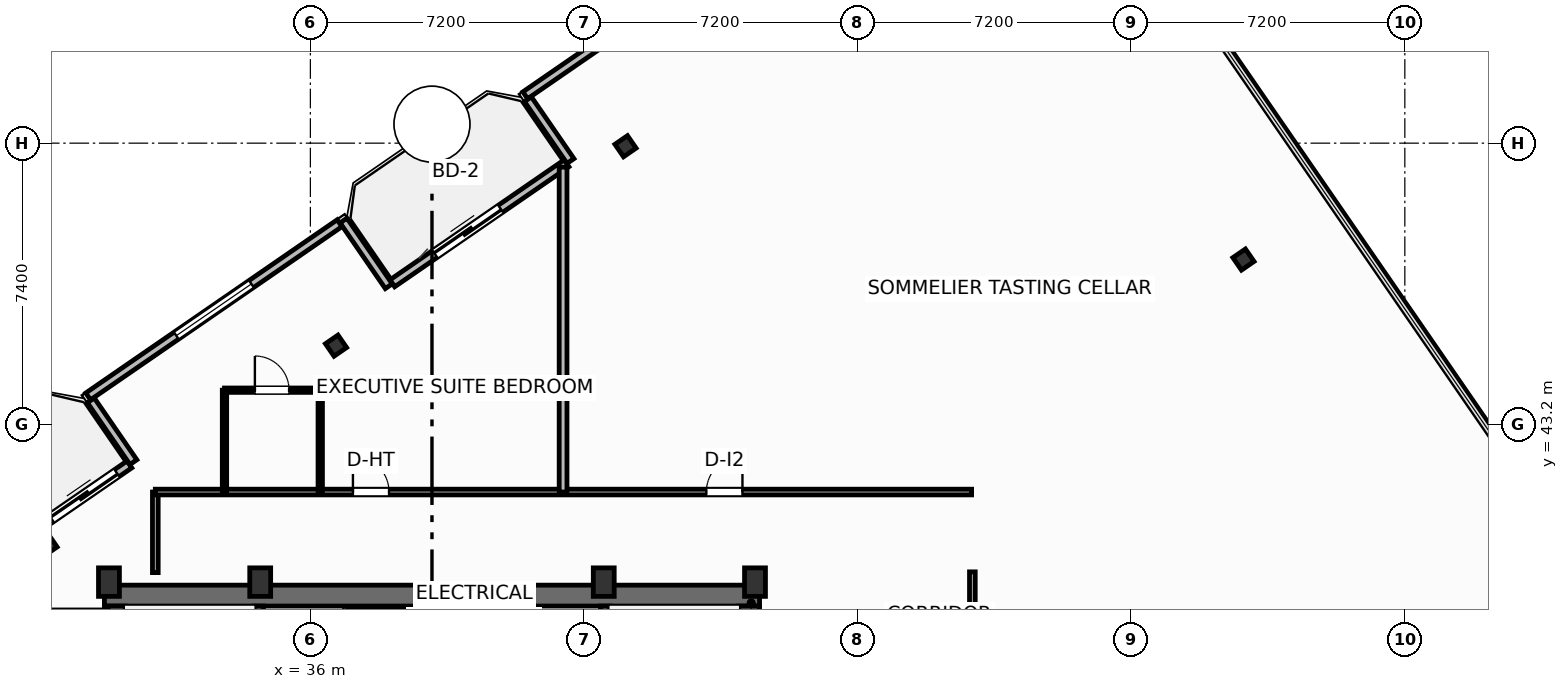
"""IFC4 building model, lengths in metres.
Left out: names, types, materials, properties, quantities, classifications, styles, units other than length and angle.
Written with IfcOpenShell. Run it as: python <this file> out.ifc"""

import sys

from ifc_helpers import new_model, si_unit, direction, frame, frame_2d, origin, origin_2d, place, context, subcontext, project, spatial, rectangle, i_section, extrude, element, fill, save


model = new_model("IFC4")
c1 = context("Model", 3, precision=1e-05, world=origin(), true_north=direction((0.0, 1.0)))
c2 = subcontext(c1, "Body", "Model", "MODEL_VIEW")
j1 = project(units=[si_unit("LENGTHUNIT", "METRE"), si_unit("PLANEANGLEUNIT", "RADIAN")], contexts=[c1])
p1 = place(None, origin())
s1 = spatial("IfcSite", under=j1, at=p1, CompositionType="ELEMENT")
p2 = place(p1, origin())
s2 = spatial("IfcBuilding", under=s1, at=p2, CompositionType="ELEMENT")
p3 = place(p2, frame((0.0, 0.0, 284.1)))
s3 = spatial("IfcBuildingStorey", under=s2, at=p3, CompositionType="ELEMENT", Elevation=284.1)
for number, where, z_axis, x_axis in (
    (1, (30.7, 39.05, 0.0), (0.0, 0.0, 1.0), (1.0, 0.0, 0.0)),
    (2, (34.68, 39.05, 0.0), (0.0, 0.0, 1.0), (1.0, 0.0, 0.0)),
    (3, (43.72, 39.05, 0.0), (0.0, 0.0, 1.0), (1.0, 0.0, 0.0)),
    (4, (47.7, 39.05, 0.0), (0.0, 0.0, 1.0), (1.0, 0.0, 0.0)),
):
    element("IfcColumn", number, at=place(p3, frame(where, z_axis=z_axis, x_axis=x_axis)), inside=s3, PredefinedType="COLUMN", context=c2, shape_type="SweptSolid", body=[
        extrude(rectangle(XDim=0.55, YDim=0.75, at=origin_2d()), origin(), (0.0, 0.0, 1.0), 3.7),
    ])
p4 = place(p3, frame((30.58, 38.695, 0.0), z_axis=(0.0, 0.0, 1.0), x_axis=(1.0, 0.0, 0.0)))
e5 = element("IfcWall", 5, at=p4, inside=s3, PredefinedType="SHEAR", context=c2, shape_type="SweptSolid", body=[
    extrude(rectangle(XDim=17.24, YDim=0.55, at=frame_2d((8.62, 0.0))), origin(), (0.0, 0.0, 1.0), 3.45),
])
for number, where, z_axis, x_axis in (
    (6, (30.855, 29.2, 0.0), (0.0, 0.0, 1.0), (0.0, 1.0, 0.0)),
    (7, (47.545, 29.2, 0.0), (0.0, 0.0, 1.0), (0.0, 1.0, 0.0)),
):
    element("IfcWall", number, at=place(p3, frame(where, z_axis=z_axis, x_axis=x_axis)), inside=s3, PredefinedType="SHEAR", context=c2, shape_type="SweptSolid", body=[
        extrude(rectangle(XDim=9.22, YDim=0.55, at=frame_2d((4.61, 0.0))), origin(), (0.0, 0.0, 1.0), 3.45),
    ])
p5 = place(p3, frame((34.64, 29.2, 0.0), z_axis=(0.0, 0.0, 1.0), x_axis=(0.0, 1.0, 0.0)))
e8 = element("IfcWall", 8, at=p5, inside=s3, PredefinedType="SHEAR", context=c2, shape_type="SweptSolid", body=[
    extrude(rectangle(XDim=9.22, YDim=0.25, at=frame_2d((4.61, 0.0))), origin(), (0.0, 0.0, 1.0), 3.45),
])
p6 = place(p5, frame((0.65, 0.0, 0.0)))
e9 = element("IfcOpeningElement", 9, at=p6, cuts=e8, PredefinedType="OPENING", context=c2, shape_type="SweptSolid", body=[
    extrude(rectangle(XDim=1.05, YDim=2.15, at=frame_2d((0.525, 1.075))), frame((0.0, 0.135, 0.0), z_axis=(0.0, -1.0, 0.0), x_axis=(1.0, 0.0, 0.0)), (0.0, 0.0, 1.0), 0.27),
])
p7 = place(p3, frame((43.76, 29.2, 0.0), z_axis=(0.0, 0.0, 1.0), x_axis=(0.0, 1.0, 0.0)))
e10 = element("IfcWall", 10, at=p7, inside=s3, PredefinedType="SHEAR", context=c2, shape_type="SweptSolid", body=[
    extrude(rectangle(XDim=9.22, YDim=0.25, at=frame_2d((4.61, 0.0))), origin(), (0.0, 0.0, 1.0), 3.45),
])
p8 = place(p7, frame((0.65, 0.0, 0.0)))
e11 = element("IfcOpeningElement", 11, at=p8, cuts=e10, PredefinedType="OPENING", context=c2, shape_type="SweptSolid", body=[
    extrude(rectangle(XDim=1.05, YDim=2.15, at=frame_2d((0.525, 1.075))), frame((0.0, 0.135, 0.0), z_axis=(0.0, -1.0, 0.0), x_axis=(1.0, 0.0, 0.0)), (0.0, 0.0, 1.0), 0.27),
])
for number, where, z_axis, x_axis in (
    (12, (60.554, 47.537, 0.0), (0.0, 0.0, 1.0), (0.824, 0.567, 0.0)),
    (13, (44.292, 50.519, 0.0), (0.0, 0.0, 1.0), (0.824, 0.567, 0.0)),
    (14, (36.675, 45.272, 0.0), (0.0, 0.0, 1.0), (0.824, 0.567, 0.0)),
    (15, (29.057, 40.025, 0.0), (0.0, 0.0, 1.0), (0.824, 0.567, 0.0)),
):
    element("IfcColumn", number, at=place(p3, frame(where, z_axis=z_axis, x_axis=x_axis)), inside=s3, PredefinedType="COLUMN", context=c2, shape_type="SweptSolid", body=[
        extrude(i_section(OverallWidth=0.401, OverallDepth=0.399, WebThickness=0.025, FlangeThickness=0.04, FilletRadius=0.022, at=origin_2d()), origin(), (0.0, 0.0, 1.0), 3.7),
    ])
p9 = place(p3, frame((26.297, 38.743, 0.0), z_axis=(0.0, 0.0, 1.0), x_axis=(0.823534636215, 0.567265989598, 0.0)))
e16 = element("IfcWall", 16, at=p9, inside=s3, PredefinedType="SOLIDWALL", context=c2, shape_type="SweptSolid", body=[
    extrude(rectangle(XDim=6.0, YDim=0.22, at=frame_2d((3.0, 0.0))), origin(), (0.0, 0.0, 1.0), 2.73),
])
p10 = place(p9, frame((3.5, 0.0, 0.0)))
e17 = element("IfcOpeningElement", 17, at=p10, cuts=e16, PredefinedType="OPENING", context=c2, shape_type="SweptSolid", body=[
    extrude(rectangle(XDim=2.1, YDim=2.3, at=frame_2d((1.05, 1.15))), frame((0.0, 0.12, 0.0), z_axis=(0.0, -1.0, 0.0), x_axis=(1.0, 0.0, 0.0)), (0.0, 0.0, 1.0), 0.24),
])
p11 = place(p9, frame((0.55, 0.0, 0.75)))
e18 = element("IfcOpeningElement", 18, at=p11, cuts=e16, PredefinedType="OPENING", context=c2, shape_type="SweptSolid", body=[
    extrude(rectangle(XDim=2.4, YDim=1.85, at=frame_2d((1.2, 0.925))), frame((0.0, 0.12, 0.0), z_axis=(0.0, -1.0, 0.0), x_axis=(1.0, 0.0, 0.0)), (0.0, 0.0, 1.0), 0.24),
])
p12 = place(p3, frame((38.156, 46.912, 0.0), z_axis=(0.0, 0.0, 1.0), x_axis=(0.823527178548, 0.567276816195, 0.0)))
e19 = element("IfcWall", 19, at=p12, inside=s3, PredefinedType="SOLIDWALL", context=c2, shape_type="SweptSolid", body=[
    extrude(rectangle(XDim=5.567, YDim=0.22, at=frame_2d((2.783, 0.0))), origin(), (0.0, 0.0, 1.0), 2.73),
])
p13 = place(p12, frame((1.36, 0.0, 0.0)))
e20 = element("IfcOpeningElement", 20, at=p13, cuts=e19, PredefinedType="OPENING", context=c2, shape_type="SweptSolid", body=[
    extrude(rectangle(XDim=2.1, YDim=2.3, at=frame_2d((1.05, 1.15))), frame((0.0, 0.12, 0.0), z_axis=(0.0, -1.0, 0.0), x_axis=(1.0, 0.0, 0.0)), (0.0, 0.0, 1.0), 0.24),
])
p14 = place(p3, frame((50.697, 58.087, 0.0), z_axis=(0.0, 0.0, 1.0), x_axis=(-0.823539455464, -0.567258993137, 0.0)))
e21 = element("IfcWall", 21, at=p14, inside=s3, PredefinedType="SOLIDWALL", context=c2, shape_type="SweptSolid", body=[
    extrude(rectangle(XDim=10.98, YDim=0.22, at=frame_2d((5.49, 0.0))), origin(), (0.0, 0.0, 1.0), 2.73),
])
p15 = place(p14, frame((4.29, 0.0, 0.8)))
e22 = element("IfcOpeningElement", 22, at=p15, cuts=e21, PredefinedType="OPENING", context=c2, shape_type="SweptSolid", body=[
    extrude(rectangle(XDim=2.4, YDim=1.85, at=frame_2d((1.2, 0.925))), frame((0.0, 0.12, 0.0), z_axis=(0.0, -1.0, 0.0), x_axis=(1.0, 0.0, 0.0)), (0.0, 0.0, 1.0), 0.24),
])
p16 = place(p3, frame((41.725, 51.756, 0.0), z_axis=(0.0, 0.0, 1.0), x_axis=(0.567273565974, -0.823529417415, 0.0)))
e23 = element("IfcWall", 23, at=p16, inside=s3, PredefinedType="SOLIDWALL", context=c2, shape_type="SweptSolid", body=[
    extrude(rectangle(XDim=1.975, YDim=0.22, at=frame_2d((0.988, 0.0))), origin(), (0.0, 0.0, 1.0), 2.73),
])
p17 = place(p3, frame((38.063, 46.835, 0.0), z_axis=(0.0, 0.0, 1.0), x_axis=(-0.567219383419, 0.823566737474, 0.0)))
e24 = element("IfcWall", 24, at=p17, inside=s3, PredefinedType="SOLIDWALL", context=c2, shape_type="SweptSolid", body=[
    extrude(rectangle(XDim=2.1, YDim=0.22, at=frame_2d((1.05, 0.0))), origin(), (0.0, 0.0, 1.0), 2.73),
])
p18 = place(p3, frame((36.769, 48.494, 0.0), z_axis=(0.0, 0.0, 1.0), x_axis=(-0.823521165086, -0.56728554596, 0.0)))
e25 = element("IfcWall", 25, at=p18, inside=s3, PredefinedType="SOLIDWALL", context=c2, shape_type="SweptSolid", body=[
    extrude(rectangle(XDim=8.035, YDim=0.22, at=frame_2d((4.018, 0.0))), origin(), (0.0, 0.0, 1.0), 2.73),
])
p19 = place(p18, frame((2.817, 0.0, 0.8)))
e26 = element("IfcOpeningElement", 26, at=p19, cuts=e25, PredefinedType="OPENING", context=c2, shape_type="SweptSolid", body=[
    extrude(rectangle(XDim=2.4, YDim=1.85, at=frame_2d((1.2, 0.925))), frame((0.0, 0.12, 0.0), z_axis=(0.0, -1.0, 0.0), x_axis=(1.0, 0.0, 0.0)), (0.0, 0.0, 1.0), 0.24),
])
p20 = place(p3, frame((30.223, 43.833, 0.0), z_axis=(0.0, 0.0, 1.0), x_axis=(0.567215821234, -0.823569190865, 0.0)))
e27 = element("IfcWall", 27, at=p20, inside=s3, PredefinedType="SOLIDWALL", context=c2, shape_type="SweptSolid", body=[
    extrude(rectangle(XDim=1.975, YDim=0.22, at=frame_2d((0.988, 0.0))), origin(), (0.0, 0.0, 1.0), 2.73),
])
p21 = place(p3, frame((53.42, 19.3, 0.0), z_axis=(0.0, 0.0, 1.0), x_axis=(0.0, 1.0, 0.0)))
e28 = element("IfcWall", 28, at=p21, inside=s3, PredefinedType="PARTITIONING", context=c2, shape_type="SweptSolid", body=[
    extrude(rectangle(XDim=20.02, YDim=0.15, at=frame_2d((10.01, 0.0))), origin(), (0.0, 0.0, 1.0), 3.45),
])
p22 = place(p21, frame((7.4, 0.0, 0.0)))
e29 = element("IfcOpeningElement", 29, at=p22, cuts=e28, PredefinedType="OPENING", context=c2, shape_type="SweptSolid", body=[
    extrude(rectangle(XDim=1.0, YDim=2.05, at=frame_2d((0.5, 1.025))), frame((0.0, 0.085, 0.0), z_axis=(0.0, -1.0, 0.0), x_axis=(1.0, 0.0, 0.0)), (0.0, 0.0, 1.0), 0.17),
])
p23 = place(p21, frame((12.5, 0.0, 0.0)))
e30 = element("IfcOpeningElement", 30, at=p23, cuts=e28, PredefinedType="OPENING", context=c2, shape_type="SweptSolid", body=[
    extrude(rectangle(XDim=1.0, YDim=2.05, at=frame_2d((0.5, 1.025))), frame((0.0, 0.085, 0.0), z_axis=(0.0, -1.0, 0.0), x_axis=(1.0, 0.0, 0.0)), (0.0, 0.0, 1.0), 0.17),
])
p24 = place(p3, frame((31.92, 39.3, 0.0), z_axis=(0.0, 0.0, 1.0), x_axis=(0.0, 1.0, 0.0)))
e31 = element("IfcWall", 31, at=p24, inside=s3, PredefinedType="PARTITIONING", context=c2, shape_type="SweptSolid", body=[
    extrude(rectangle(XDim=2.12, YDim=0.15, at=frame_2d((1.06, 0.0))), origin(), (0.0, 0.0, 1.0), 3.45),
])
p25 = place(p3, frame((31.92, 41.42, 0.0), z_axis=(0.0, 0.0, 1.0), x_axis=(1.0, 0.0, 0.0)))
e32 = element("IfcWall", 32, at=p25, inside=s3, PredefinedType="PARTITIONING", context=c2, shape_type="SweptSolid", body=[
    extrude(rectangle(XDim=21.48, YDim=0.15, at=frame_2d((10.74, 0.0))), origin(), (0.0, 0.0, 1.0), 3.45),
])
p26 = place(p25, frame((5.2, 0.0, 0.0)))
e33 = element("IfcOpeningElement", 33, at=p26, cuts=e32, PredefinedType="OPENING", context=c2, shape_type="SweptSolid", body=[
    extrude(rectangle(XDim=0.95, YDim=2.15, at=frame_2d((0.475, 1.075))), frame((0.0, 0.085, 0.0), z_axis=(0.0, -1.0, 0.0), x_axis=(1.0, 0.0, 0.0)), (0.0, 0.0, 1.0), 0.17),
])
p27 = place(p25, frame((14.5, 0.0, 0.0)))
e34 = element("IfcOpeningElement", 34, at=p27, cuts=e32, PredefinedType="OPENING", context=c2, shape_type="SweptSolid", body=[
    extrude(rectangle(XDim=0.95, YDim=2.05, at=frame_2d((0.475, 1.025))), frame((0.0, 0.085, 0.0), z_axis=(0.0, -1.0, 0.0), x_axis=(1.0, 0.0, 0.0)), (0.0, 0.0, 1.0), 0.17),
])
p28 = place(p3, frame((33.74, 41.42, 0.0), z_axis=(0.0, 0.0, 1.0), x_axis=(0.0, 1.0, 0.0)))
e35 = element("IfcWall", 35, at=p28, inside=s3, PredefinedType="PARTITIONING", context=c2, shape_type="SweptSolid", body=[
    extrude(rectangle(XDim=2.68, YDim=0.115, at=frame_2d((1.34, 0.0))), origin(), (0.0, 0.0, 1.0), 3.45),
])
p29 = place(p3, frame((36.26, 41.42, 0.0), z_axis=(0.0, 0.0, 1.0), x_axis=(0.0, 1.0, 0.0)))
e36 = element("IfcWall", 36, at=p29, inside=s3, PredefinedType="PARTITIONING", context=c2, shape_type="SweptSolid", body=[
    extrude(rectangle(XDim=2.68, YDim=0.115, at=frame_2d((1.34, 0.0))), origin(), (0.0, 0.0, 1.0), 2.739),
])
p30 = place(p3, frame((33.74, 44.1, 0.0), z_axis=(0.0, 0.0, 1.0), x_axis=(1.0, 0.0, 0.0)))
e37 = element("IfcWall", 37, at=p30, inside=s3, PredefinedType="PARTITIONING", context=c2, shape_type="SweptSolid", body=[
    extrude(rectangle(XDim=2.52, YDim=0.115, at=frame_2d((1.26, 0.0))), origin(), (0.0, 0.0, 1.0), 3.45),
])
p31 = place(p30, frame((0.8, 0.0, 0.0)))
e38 = element("IfcOpeningElement", 38, at=p31, cuts=e37, PredefinedType="OPENING", context=c2, shape_type="SweptSolid", body=[
    extrude(rectangle(XDim=0.9, YDim=2.05, at=frame_2d((0.45, 1.025))), frame((0.0, 0.067, 0.0), z_axis=(0.0, -1.0, 0.0), x_axis=(1.0, 0.0, 0.0)), (0.0, 0.0, 1.0), 0.135),
])
p32 = place(p3, frame((42.65, 41.42, 0.0), z_axis=(0.0, 0.0, 1.0), x_axis=(0.0, 1.0, 0.0)))
e39 = element("IfcWall", 39, at=p32, inside=s3, PredefinedType="PARTITIONING", context=c2, shape_type="SweptSolid", body=[
    extrude(rectangle(XDim=8.551, YDim=0.205, at=frame_2d((4.275, 0.0))), origin(), (0.0, 0.0, 1.0), 3.45),
])
p33 = place(p10, origin())
e40 = element("IfcDoor", 40, at=p33, inside=s3, OperationType="SLIDING_TO_LEFT", PredefinedType="DOOR", context=c2, shape_type="SweptSolid", body=[
    extrude(rectangle(XDim=2.1, YDim=2.3, at=frame_2d((1.05, 1.15))), frame((0.0, 0.025, 0.0), z_axis=(0.0, -1.0, 0.0), x_axis=(1.0, 0.0, 0.0)), (0.0, 0.0, 1.0), 0.05),
])
fill(e17, e40)
p34 = place(p13, origin())
e41 = element("IfcDoor", 41, at=p34, inside=s3, OperationType="SLIDING_TO_LEFT", PredefinedType="DOOR", context=c2, shape_type="SweptSolid", body=[
    extrude(rectangle(XDim=2.1, YDim=2.3, at=frame_2d((1.05, 1.15))), frame((0.0, 0.025, 0.0), z_axis=(0.0, -1.0, 0.0), x_axis=(1.0, 0.0, 0.0)), (0.0, 0.0, 1.0), 0.05),
])
fill(e20, e41)
p35 = place(p19, origin())
e42 = element("IfcWindow", 42, at=p35, inside=s3, PartitioningType="SINGLE_PANEL", PredefinedType="WINDOW", context=c2, shape_type="SweptSolid", body=[
    extrude(rectangle(XDim=2.4, YDim=1.85, at=frame_2d((1.2, 0.925))), frame((0.0, 0.03, 0.0), z_axis=(0.0, -1.0, 0.0), x_axis=(1.0, 0.0, 0.0)), (0.0, 0.0, 1.0), 0.06),
])
fill(e26, e42)
p36 = place(p26, origin())
e43 = element("IfcDoor", 43, at=p36, inside=s3, OperationType="SINGLE_SWING_LEFT", PredefinedType="DOOR", context=c2, shape_type="SweptSolid", body=[
    extrude(rectangle(XDim=0.95, YDim=2.15, at=frame_2d((0.475, 1.075))), frame((0.0, 0.025, 0.0), z_axis=(0.0, -1.0, 0.0), x_axis=(1.0, 0.0, 0.0)), (0.0, 0.0, 1.0), 0.05),
])
fill(e33, e43)
p37 = place(p27, origin())
e44 = element("IfcDoor", 44, at=p37, inside=s3, OperationType="SINGLE_SWING_RIGHT", PredefinedType="DOOR", context=c2, shape_type="SweptSolid", body=[
    extrude(rectangle(XDim=0.95, YDim=2.05, at=frame_2d((0.475, 1.025))), frame((0.0, 0.025, 0.0), z_axis=(0.0, -1.0, 0.0), x_axis=(1.0, 0.0, 0.0)), (0.0, 0.0, 1.0), 0.05),
])
fill(e34, e44)
p38 = place(p31, origin())
e45 = element("IfcDoor", 45, at=p38, inside=s3, OperationType="SINGLE_SWING_LEFT", PredefinedType="DOOR", context=c2, shape_type="SweptSolid", body=[
    extrude(rectangle(XDim=0.9, YDim=2.05, at=frame_2d((0.45, 1.025))), frame((0.0, 0.025, 0.0), z_axis=(0.0, -1.0, 0.0), x_axis=(1.0, 0.0, 0.0)), (0.0, 0.0, 1.0), 0.05),
])
fill(e38, e45)
save(model, sys.argv[1])
